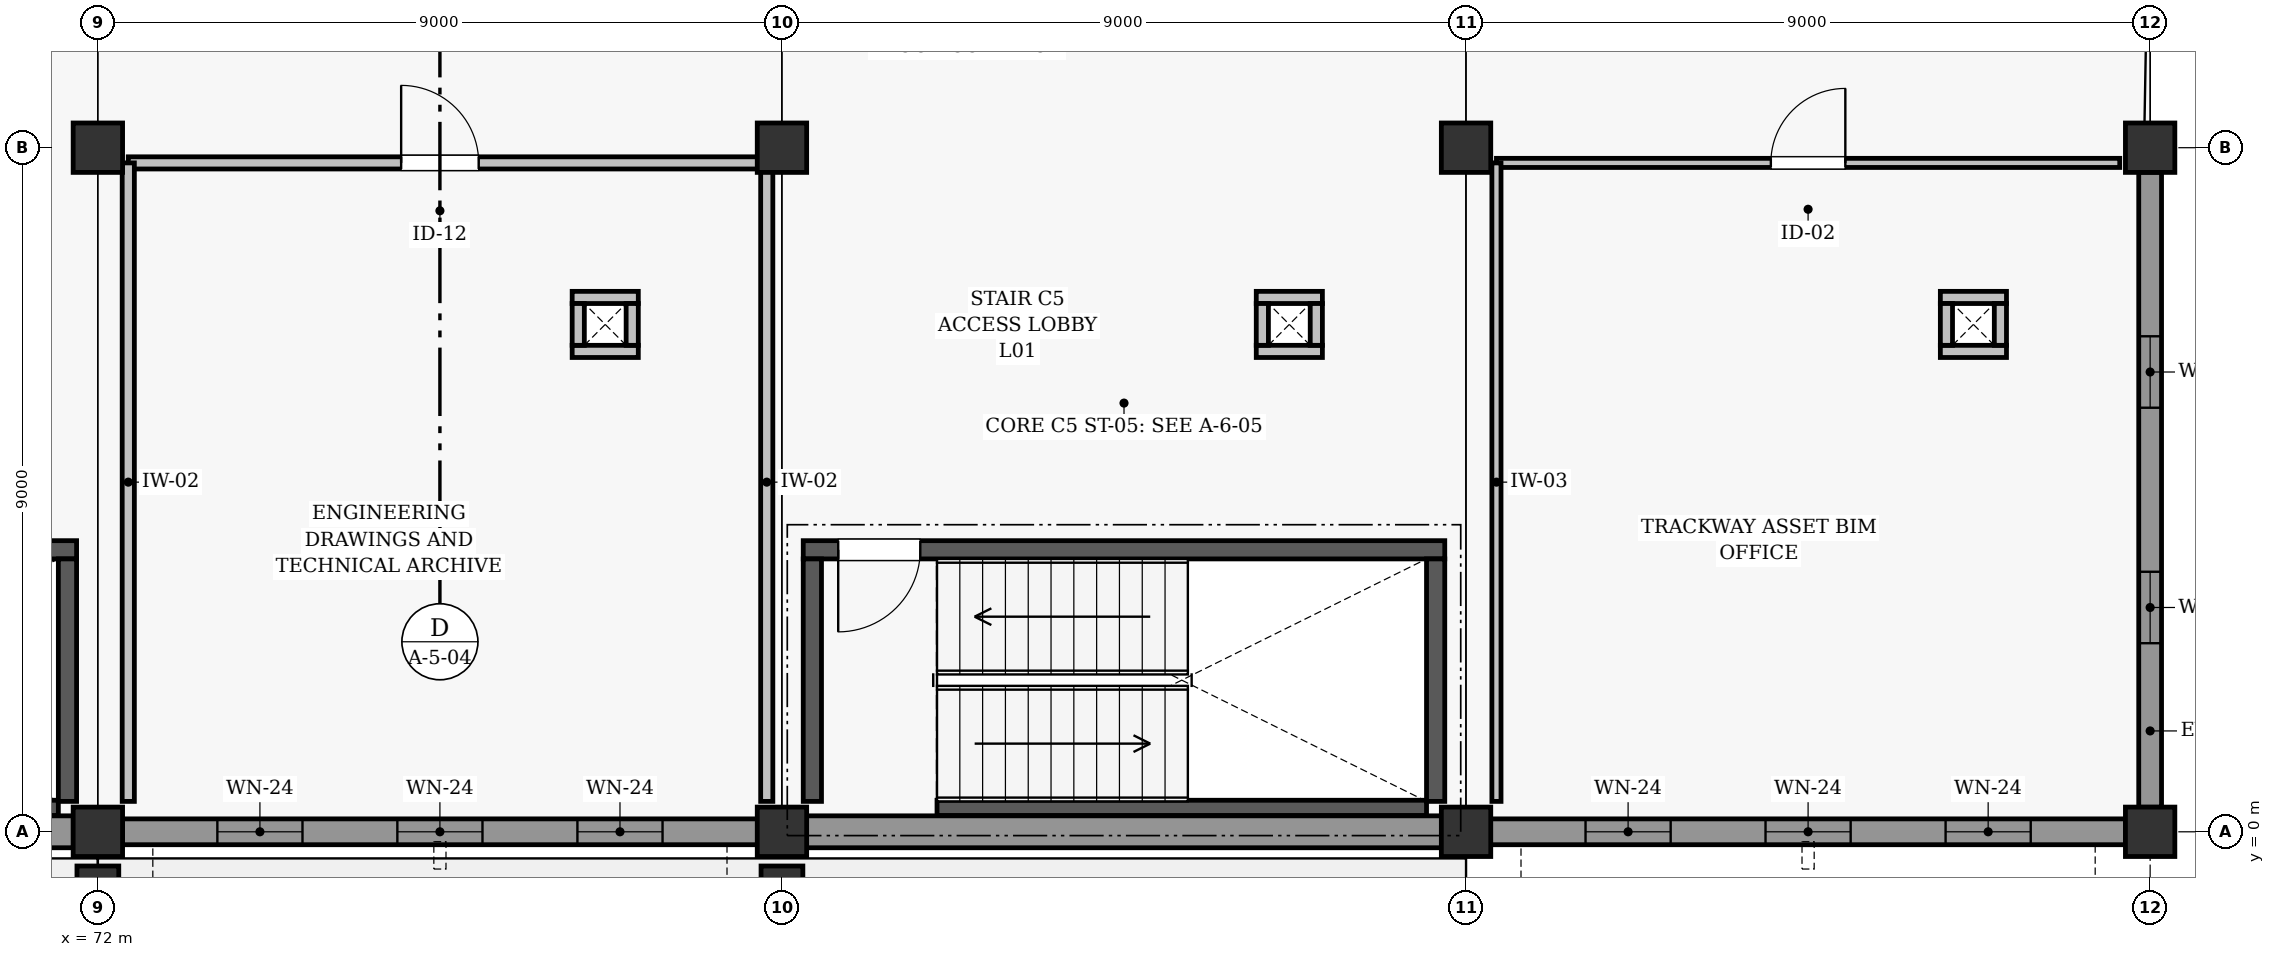
"""IFC4 building model, lengths in metres.
Left out: names, types, materials, properties, quantities, classifications, styles, units other than length and angle.
Written with IfcOpenShell. Run it as: python <this file> out.ifc"""

import sys

from ifc_helpers import new_model, si_unit, direction, frame, frame_2d, origin, origin_2d, place, context, subcontext, project, spatial, rectangle, extrude, element, fill, save


model = new_model("IFC4")
c1 = context("Model", 3, precision=1e-05, world=origin(), true_north=direction((0.0, 1.0)))
c2 = subcontext(c1, "Body", "Model", "MODEL_VIEW")
j1 = project(units=[si_unit("LENGTHUNIT", "METRE"), si_unit("PLANEANGLEUNIT", "RADIAN")], contexts=[c1])
p1 = place(None, origin())
s1 = spatial("IfcSite", under=j1, at=p1, CompositionType="ELEMENT")
p2 = place(p1, origin())
s2 = spatial("IfcBuilding", under=s1, at=p2, CompositionType="ELEMENT")
p3 = place(p2, frame((0.0, 0.0, 4.8)))
s3 = spatial("IfcBuildingStorey", under=s2, at=p3, CompositionType="ELEMENT", Elevation=4.8)
for number, where, z_axis, x_axis in (
    (1, (72.0, 0.0, 0.0), (0.0, 0.0, 1.0), (1.0, 0.0, 0.0)),
    (2, (72.0, 9.0, 0.0), (0.0, 0.0, 1.0), (1.0, 0.0, 0.0)),
    (3, (81.0, 0.0, 0.0), (0.0, 0.0, 1.0), (1.0, 0.0, 0.0)),
    (4, (81.0, 9.0, 0.0), (0.0, 0.0, 1.0), (1.0, 0.0, 0.0)),
    (5, (90.0, 0.0, 0.0), (0.0, 0.0, 1.0), (1.0, 0.0, 0.0)),
    (6, (90.0, 9.0, 0.0), (0.0, 0.0, 1.0), (1.0, 0.0, 0.0)),
    (7, (99.0, 0.0, 0.0), (0.0, 0.0, 1.0), (1.0, 0.0, 0.0)),
    (8, (99.0, 9.0, 0.0), (0.0, 0.0, 1.0), (1.0, 0.0, 0.0)),
):
    element("IfcColumn", number, at=place(p3, frame(where, z_axis=z_axis, x_axis=x_axis)), inside=s3, PredefinedType="COLUMN", context=c2, shape_type="SweptSolid", body=[
        extrude(rectangle(XDim=0.65, YDim=0.65, at=origin_2d()), origin(), (0.0, 0.0, 1.0), 3.6),
    ])
for number, where, z_axis, x_axis in (
    (9, (72.0, -0.85, 0.0), (0.0, 0.0, 1.0), (1.0, 0.0, 0.0)),
    (10, (81.0, -0.85, 0.0), (0.0, 0.0, 1.0), (1.0, 0.0, 0.0)),
):
    element("IfcColumn", number, at=place(p3, frame(where, z_axis=z_axis, x_axis=x_axis)), inside=s3, PredefinedType="PILASTER", context=c2, shape_type="SweptSolid", body=[
        extrude(rectangle(XDim=0.55, YDim=0.8, at=origin_2d()), origin(), (0.0, 0.0, 1.0), 3.6),
    ])
p4 = place(p3, frame((63.323, 0.0, 0.0), z_axis=(0.0, 0.0, 1.0), x_axis=(1.0, 0.0, 0.0)))
e11 = element("IfcWall", 11, at=p4, inside=s3, PredefinedType="SOLIDWALL", context=c2, shape_type="SweptSolid", body=[
    extrude(rectangle(XDim=8.354, YDim=0.42, at=frame_2d((4.177, 0.0))), origin(), (0.0, 0.0, 1.0), 2.642),
])
p5 = place(p3, frame((72.323, 0.0, 0.0), z_axis=(0.0, 0.0, 1.0), x_axis=(1.0, 0.0, 0.0)))
e12 = element("IfcWall", 12, at=p5, inside=s3, PredefinedType="SOLIDWALL", context=c2, shape_type="SweptSolid", body=[
    extrude(rectangle(XDim=8.354, YDim=0.34, at=frame_2d((4.177, 0.0))), origin(), (0.0, 0.0, 1.0), 2.642),
])
p6 = place(p5, frame((1.249, 0.0, 0.8)))
e13 = element("IfcOpeningElement", 13, at=p6, cuts=e12, PredefinedType="OPENING", context=c2, shape_type="SweptSolid", body=[
    extrude(rectangle(XDim=1.12, YDim=1.08, at=frame_2d((0.56, 0.54))), frame((0.0, 0.18, 0.0), z_axis=(0.0, -1.0, 0.0), x_axis=(1.0, 0.0, 0.0)), (0.0, 0.0, 1.0), 0.36),
])
p7 = place(p5, frame((3.617, 0.0, 0.8)))
e14 = element("IfcOpeningElement", 14, at=p7, cuts=e12, PredefinedType="OPENING", context=c2, shape_type="SweptSolid", body=[
    extrude(rectangle(XDim=1.12, YDim=1.08, at=frame_2d((0.56, 0.54))), frame((0.0, 0.18, 0.0), z_axis=(0.0, -1.0, 0.0), x_axis=(1.0, 0.0, 0.0)), (0.0, 0.0, 1.0), 0.36),
])
p8 = place(p5, frame((5.986, 0.0, 0.8)))
e15 = element("IfcOpeningElement", 15, at=p8, cuts=e12, PredefinedType="OPENING", context=c2, shape_type="SweptSolid", body=[
    extrude(rectangle(XDim=1.12, YDim=1.08, at=frame_2d((0.56, 0.54))), frame((0.0, 0.18, 0.0), z_axis=(0.0, -1.0, 0.0), x_axis=(1.0, 0.0, 0.0)), (0.0, 0.0, 1.0), 0.36),
])
p9 = place(p3, frame((81.323, 0.0, 0.0), z_axis=(0.0, 0.0, 1.0), x_axis=(1.0, 0.0, 0.0)))
e16 = element("IfcWall", 16, at=p9, inside=s3, PredefinedType="SOLIDWALL", context=c2, shape_type="SweptSolid", body=[
    extrude(rectangle(XDim=8.354, YDim=0.42, at=frame_2d((4.177, 0.0))), origin(), (0.0, 0.0, 1.0), 2.642),
])
p10 = place(p3, frame((90.323, 0.0, 0.0), z_axis=(0.0, 0.0, 1.0), x_axis=(1.0, 0.0, 0.0)))
e17 = element("IfcWall", 17, at=p10, inside=s3, PredefinedType="SOLIDWALL", context=c2, shape_type="SweptSolid", body=[
    extrude(rectangle(XDim=8.354, YDim=0.34, at=frame_2d((4.177, 0.0))), origin(), (0.0, 0.0, 1.0), 2.702),
])
p11 = place(p10, frame((1.249, 0.0, 0.8)))
e18 = element("IfcOpeningElement", 18, at=p11, cuts=e17, PredefinedType="OPENING", context=c2, shape_type="SweptSolid", body=[
    extrude(rectangle(XDim=1.12, YDim=1.08, at=frame_2d((0.56, 0.54))), frame((0.0, 0.18, 0.0), z_axis=(0.0, -1.0, 0.0), x_axis=(1.0, 0.0, 0.0)), (0.0, 0.0, 1.0), 0.36),
])
p12 = place(p10, frame((3.617, 0.0, 0.8)))
e19 = element("IfcOpeningElement", 19, at=p12, cuts=e17, PredefinedType="OPENING", context=c2, shape_type="SweptSolid", body=[
    extrude(rectangle(XDim=1.12, YDim=1.08, at=frame_2d((0.56, 0.54))), frame((0.0, 0.18, 0.0), z_axis=(0.0, -1.0, 0.0), x_axis=(1.0, 0.0, 0.0)), (0.0, 0.0, 1.0), 0.36),
])
p13 = place(p10, frame((5.986, 0.0, 0.8)))
e20 = element("IfcOpeningElement", 20, at=p13, cuts=e17, PredefinedType="OPENING", context=c2, shape_type="SweptSolid", body=[
    extrude(rectangle(XDim=1.12, YDim=1.08, at=frame_2d((0.56, 0.54))), frame((0.0, 0.18, 0.0), z_axis=(0.0, -1.0, 0.0), x_axis=(1.0, 0.0, 0.0)), (0.0, 0.0, 1.0), 0.36),
])
p14 = place(p3, frame((99.0, 0.323, 0.0), z_axis=(0.0, 0.0, 1.0), x_axis=(0.0, 1.0, 0.0)))
e21 = element("IfcWall", 21, at=p14, inside=s3, PredefinedType="SOLIDWALL", context=c2, shape_type="SweptSolid", body=[
    extrude(rectangle(XDim=8.354, YDim=0.3, at=frame_2d((4.177, 0.0))), origin(), (0.0, 0.0, 1.0), 2.902),
])
p15 = place(p14, frame((2.158, 0.0, 0.85)))
e22 = element("IfcOpeningElement", 22, at=p15, cuts=e21, PredefinedType="OPENING", context=c2, shape_type="SweptSolid", body=[
    extrude(rectangle(XDim=0.94, YDim=1.28, at=frame_2d((0.47, 0.64))), frame((0.0, 0.16, 0.0), z_axis=(0.0, -1.0, 0.0), x_axis=(1.0, 0.0, 0.0)), (0.0, 0.0, 1.0), 0.32),
])
p16 = place(p14, frame((5.256, 0.0, 0.85)))
e23 = element("IfcOpeningElement", 23, at=p16, cuts=e21, PredefinedType="OPENING", context=c2, shape_type="SweptSolid", body=[
    extrude(rectangle(XDim=0.94, YDim=1.28, at=frame_2d((0.47, 0.64))), frame((0.0, 0.16, 0.0), z_axis=(0.0, -1.0, 0.0), x_axis=(1.0, 0.0, 0.0)), (0.0, 0.0, 1.0), 0.32),
])
p17 = place(p3, frame((65.04, 0.315, 0.0), z_axis=(0.0, 0.0, 1.0), x_axis=(1.0, 0.0, 0.0)))
e24 = element("IfcWall", 24, at=p17, inside=s3, PredefinedType="SHEAR", context=c2, shape_type="SweptSolid", body=[
    extrude(rectangle(XDim=6.44, YDim=0.2, at=frame_2d((3.22, 0.0))), origin(), (0.0, 0.0, 1.0), 3.35),
])
p18 = place(p3, frame((63.28, 3.71, 0.0), z_axis=(0.0, 0.0, 1.0), x_axis=(1.0, 0.0, 0.0)))
e25 = element("IfcWall", 25, at=p18, inside=s3, PredefinedType="SHEAR", context=c2, shape_type="SweptSolid", body=[
    extrude(rectangle(XDim=8.44, YDim=0.24, at=frame_2d((4.22, 0.0))), origin(), (0.0, 0.0, 1.0), 3.35),
])
p19 = place(p18, frame((0.46, 0.0, 0.0)))
e26 = element("IfcOpeningElement", 26, at=p19, cuts=e25, PredefinedType="OPENING", context=c2, shape_type="SweptSolid", body=[
    extrude(rectangle(XDim=1.08, YDim=2.08, at=frame_2d((0.54, 1.04))), frame((0.0, 0.13, 0.0), z_axis=(0.0, -1.0, 0.0), x_axis=(1.0, 0.0, 0.0)), (0.0, 0.0, 1.0), 0.26),
])
p20 = place(p3, frame((71.6, 0.4, 0.0), z_axis=(0.0, 0.0, 1.0), x_axis=(0.0, 1.0, 0.0)))
e27 = element("IfcWall", 27, at=p20, inside=s3, PredefinedType="SHEAR", context=c2, shape_type="SweptSolid", body=[
    extrude(rectangle(XDim=3.19, YDim=0.24, at=frame_2d((1.595, 0.0))), origin(), (0.0, 0.0, 1.0), 3.35),
])
p21 = place(p3, frame((83.04, 0.315, 0.0), z_axis=(0.0, 0.0, 1.0), x_axis=(1.0, 0.0, 0.0)))
e28 = element("IfcWall", 28, at=p21, inside=s3, PredefinedType="SHEAR", context=c2, shape_type="SweptSolid", body=[
    extrude(rectangle(XDim=6.44, YDim=0.2, at=frame_2d((3.22, 0.0))), origin(), (0.0, 0.0, 1.0), 3.35),
])
p22 = place(p3, frame((81.28, 3.71, 0.0), z_axis=(0.0, 0.0, 1.0), x_axis=(1.0, 0.0, 0.0)))
e29 = element("IfcWall", 29, at=p22, inside=s3, PredefinedType="SHEAR", context=c2, shape_type="SweptSolid", body=[
    extrude(rectangle(XDim=8.44, YDim=0.24, at=frame_2d((4.22, 0.0))), origin(), (0.0, 0.0, 1.0), 3.35),
])
p23 = place(p22, frame((0.46, 0.0, 0.0)))
e30 = element("IfcOpeningElement", 30, at=p23, cuts=e29, PredefinedType="OPENING", context=c2, shape_type="SweptSolid", body=[
    extrude(rectangle(XDim=1.08, YDim=2.08, at=frame_2d((0.54, 1.04))), frame((0.0, 0.13, 0.0), z_axis=(0.0, -1.0, 0.0), x_axis=(1.0, 0.0, 0.0)), (0.0, 0.0, 1.0), 0.26),
])
for number, where, z_axis, x_axis in (
    (31, (81.4, 0.4, 0.0), (0.0, 0.0, 1.0), (0.0, 1.0, 0.0)),
    (32, (89.6, 0.4, 0.0), (0.0, 0.0, 1.0), (0.0, 1.0, 0.0)),
):
    element("IfcWall", number, at=place(p3, frame(where, z_axis=z_axis, x_axis=x_axis)), inside=s3, PredefinedType="SHEAR", context=c2, shape_type="SweptSolid", body=[
        extrude(rectangle(XDim=3.19, YDim=0.24, at=frame_2d((1.595, 0.0))), origin(), (0.0, 0.0, 1.0), 3.35),
    ])
for number, where, z_axis, x_axis in (
    (33, (78.24, 6.32, 0.0), (0.0, 0.0, 1.0), (1.0, 0.0, 0.0)),
    (34, (78.24, 7.03, 0.0), (0.0, 0.0, 1.0), (1.0, 0.0, 0.0)),
):
    element("IfcWall", number, at=place(p3, frame(where, z_axis=z_axis, x_axis=x_axis)), inside=s3, PredefinedType="PARTITIONING", context=c2, shape_type="SweptSolid", body=[
        extrude(rectangle(XDim=0.87, YDim=0.16, at=frame_2d((0.435, 0.0))), origin(), (0.0, 0.0, 1.0), 3.35),
    ])
for number, where, z_axis, x_axis in (
    (35, (78.32, 6.4, 0.0), (0.0, 0.0, 1.0), (0.0, 1.0, 0.0)),
    (36, (79.03, 6.4, 0.0), (0.0, 0.0, 1.0), (0.0, 1.0, 0.0)),
):
    element("IfcWall", number, at=place(p3, frame(where, z_axis=z_axis, x_axis=x_axis)), inside=s3, PredefinedType="PARTITIONING", context=c2, shape_type="SweptSolid", body=[
        extrude(rectangle(XDim=0.55, YDim=0.16, at=frame_2d((0.275, 0.0))), origin(), (0.0, 0.0, 1.0), 3.35),
    ])
for number, where, z_axis, x_axis in (
    (37, (87.24, 6.32, 0.0), (0.0, 0.0, 1.0), (1.0, 0.0, 0.0)),
    (38, (87.24, 7.03, 0.0), (0.0, 0.0, 1.0), (1.0, 0.0, 0.0)),
):
    element("IfcWall", number, at=place(p3, frame(where, z_axis=z_axis, x_axis=x_axis)), inside=s3, PredefinedType="PARTITIONING", context=c2, shape_type="SweptSolid", body=[
        extrude(rectangle(XDim=0.87, YDim=0.16, at=frame_2d((0.435, 0.0))), origin(), (0.0, 0.0, 1.0), 3.35),
    ])
for number, where, z_axis, x_axis in (
    (39, (87.32, 6.4, 0.0), (0.0, 0.0, 1.0), (0.0, 1.0, 0.0)),
    (40, (88.03, 6.4, 0.0), (0.0, 0.0, 1.0), (0.0, 1.0, 0.0)),
):
    element("IfcWall", number, at=place(p3, frame(where, z_axis=z_axis, x_axis=x_axis)), inside=s3, PredefinedType="PARTITIONING", context=c2, shape_type="SweptSolid", body=[
        extrude(rectangle(XDim=0.55, YDim=0.16, at=frame_2d((0.275, 0.0))), origin(), (0.0, 0.0, 1.0), 3.35),
    ])
for number, where, z_axis, x_axis in (
    (41, (96.24, 6.32, 0.0), (0.0, 0.0, 1.0), (1.0, 0.0, 0.0)),
    (42, (96.24, 7.03, 0.0), (0.0, 0.0, 1.0), (1.0, 0.0, 0.0)),
):
    element("IfcWall", number, at=place(p3, frame(where, z_axis=z_axis, x_axis=x_axis)), inside=s3, PredefinedType="PARTITIONING", context=c2, shape_type="SweptSolid", body=[
        extrude(rectangle(XDim=0.87, YDim=0.16, at=frame_2d((0.435, 0.0))), origin(), (0.0, 0.0, 1.0), 3.35),
    ])
for number, where, z_axis, x_axis in (
    (43, (96.32, 6.4, 0.0), (0.0, 0.0, 1.0), (0.0, 1.0, 0.0)),
    (44, (97.03, 6.4, 0.0), (0.0, 0.0, 1.0), (0.0, 1.0, 0.0)),
):
    element("IfcWall", number, at=place(p3, frame(where, z_axis=z_axis, x_axis=x_axis)), inside=s3, PredefinedType="PARTITIONING", context=c2, shape_type="SweptSolid", body=[
        extrude(rectangle(XDim=0.55, YDim=0.16, at=frame_2d((0.275, 0.0))), origin(), (0.0, 0.0, 1.0), 3.35),
    ])
p24 = place(p3, frame((72.4, 8.8, 0.0), z_axis=(0.0, 0.0, 1.0), x_axis=(1.0, 0.0, 0.0)))
e45 = element("IfcWall", 45, at=p24, inside=s3, PredefinedType="PARTITIONING", context=c2, shape_type="SweptSolid", body=[
    extrude(rectangle(XDim=8.4, YDim=0.16, at=frame_2d((4.2, 0.0))), origin(), (0.0, 0.0, 1.0), 2.595),
])
p25 = place(p24, frame((3.59, 0.0, 0.0)))
e46 = element("IfcOpeningElement", 46, at=p25, cuts=e45, PredefinedType="OPENING", context=c2, shape_type="SweptSolid", body=[
    extrude(rectangle(XDim=1.02, YDim=2.1, at=frame_2d((0.51, 1.05))), frame((0.0, 0.09, 0.0), z_axis=(0.0, -1.0, 0.0), x_axis=(1.0, 0.0, 0.0)), (0.0, 0.0, 1.0), 0.18),
])
for number, where, z_axis, x_axis in (
    (47, (72.4, 0.4, 0.0), (0.0, 0.0, 1.0), (0.0, 1.0, 0.0)),
    (48, (80.8, 0.4, 0.0), (0.0, 0.0, 1.0), (0.0, 1.0, 0.0)),
):
    element("IfcWall", number, at=place(p3, frame(where, z_axis=z_axis, x_axis=x_axis)), inside=s3, PredefinedType="PARTITIONING", context=c2, shape_type="SweptSolid", body=[
        extrude(rectangle(XDim=8.4, YDim=0.16, at=frame_2d((4.2, 0.0))), origin(), (0.0, 0.0, 1.0), 2.595),
    ])
p26 = place(p3, frame((90.4, 8.8, 0.0), z_axis=(0.0, 0.0, 1.0), x_axis=(1.0, 0.0, 0.0)))
e49 = element("IfcWall", 49, at=p26, inside=s3, PredefinedType="PARTITIONING", context=c2, shape_type="SweptSolid", body=[
    extrude(rectangle(XDim=8.2, YDim=0.12, at=frame_2d((4.1, 0.0))), origin(), (0.0, 0.0, 1.0), 2.655),
])
p27 = place(p26, frame((3.61, 0.0, 0.0)))
e50 = element("IfcOpeningElement", 50, at=p27, cuts=e49, PredefinedType="OPENING", context=c2, shape_type="SweptSolid", body=[
    extrude(rectangle(XDim=0.98, YDim=2.08, at=frame_2d((0.49, 1.04))), frame((0.0, 0.07, 0.0), z_axis=(0.0, -1.0, 0.0), x_axis=(1.0, 0.0, 0.0)), (0.0, 0.0, 1.0), 0.14),
])
p28 = place(p3, frame((90.4, 0.4, 0.0), z_axis=(0.0, 0.0, 1.0), x_axis=(0.0, 1.0, 0.0)))
e51 = element("IfcWall", 51, at=p28, inside=s3, PredefinedType="PARTITIONING", context=c2, shape_type="SweptSolid", body=[
    extrude(rectangle(XDim=8.4, YDim=0.12, at=frame_2d((4.2, 0.0))), origin(), (0.0, 0.0, 1.0), 2.655),
])
p29 = place(p6, origin())
e52 = element("IfcWindow", 52, at=p29, inside=s3, PartitioningType="SINGLE_PANEL", PredefinedType="WINDOW", context=c2, shape_type="SweptSolid", body=[
    extrude(rectangle(XDim=1.12, YDim=1.08, at=frame_2d((0.56, 0.54))), frame((0.0, 0.03, 0.0), z_axis=(0.0, -1.0, 0.0), x_axis=(1.0, 0.0, 0.0)), (0.0, 0.0, 1.0), 0.06),
])
fill(e13, e52)
p30 = place(p7, origin())
e53 = element("IfcWindow", 53, at=p30, inside=s3, PartitioningType="SINGLE_PANEL", PredefinedType="WINDOW", context=c2, shape_type="SweptSolid", body=[
    extrude(rectangle(XDim=1.12, YDim=1.08, at=frame_2d((0.56, 0.54))), frame((0.0, 0.03, 0.0), z_axis=(0.0, -1.0, 0.0), x_axis=(1.0, 0.0, 0.0)), (0.0, 0.0, 1.0), 0.06),
])
fill(e14, e53)
p31 = place(p8, origin())
e54 = element("IfcWindow", 54, at=p31, inside=s3, PartitioningType="SINGLE_PANEL", PredefinedType="WINDOW", context=c2, shape_type="SweptSolid", body=[
    extrude(rectangle(XDim=1.12, YDim=1.08, at=frame_2d((0.56, 0.54))), frame((0.0, 0.03, 0.0), z_axis=(0.0, -1.0, 0.0), x_axis=(1.0, 0.0, 0.0)), (0.0, 0.0, 1.0), 0.06),
])
fill(e15, e54)
p32 = place(p11, origin())
e55 = element("IfcWindow", 55, at=p32, inside=s3, PartitioningType="SINGLE_PANEL", PredefinedType="WINDOW", context=c2, shape_type="SweptSolid", body=[
    extrude(rectangle(XDim=1.12, YDim=1.08, at=frame_2d((0.56, 0.54))), frame((0.0, 0.03, 0.0), z_axis=(0.0, -1.0, 0.0), x_axis=(1.0, 0.0, 0.0)), (0.0, 0.0, 1.0), 0.06),
])
fill(e18, e55)
p33 = place(p12, origin())
e56 = element("IfcWindow", 56, at=p33, inside=s3, PartitioningType="SINGLE_PANEL", PredefinedType="WINDOW", context=c2, shape_type="SweptSolid", body=[
    extrude(rectangle(XDim=1.12, YDim=1.08, at=frame_2d((0.56, 0.54))), frame((0.0, 0.03, 0.0), z_axis=(0.0, -1.0, 0.0), x_axis=(1.0, 0.0, 0.0)), (0.0, 0.0, 1.0), 0.06),
])
fill(e19, e56)
p34 = place(p13, origin())
e57 = element("IfcWindow", 57, at=p34, inside=s3, PartitioningType="SINGLE_PANEL", PredefinedType="WINDOW", context=c2, shape_type="SweptSolid", body=[
    extrude(rectangle(XDim=1.12, YDim=1.08, at=frame_2d((0.56, 0.54))), frame((0.0, 0.03, 0.0), z_axis=(0.0, -1.0, 0.0), x_axis=(1.0, 0.0, 0.0)), (0.0, 0.0, 1.0), 0.06),
])
fill(e20, e57)
p35 = place(p15, origin())
e58 = element("IfcWindow", 58, at=p35, inside=s3, PartitioningType="SINGLE_PANEL", PredefinedType="WINDOW", context=c2, shape_type="SweptSolid", body=[
    extrude(rectangle(XDim=0.94, YDim=1.28, at=frame_2d((0.47, 0.64))), frame((0.0, 0.03, 0.0), z_axis=(0.0, -1.0, 0.0), x_axis=(1.0, 0.0, 0.0)), (0.0, 0.0, 1.0), 0.06),
])
fill(e22, e58)
p36 = place(p16, origin())
e59 = element("IfcWindow", 59, at=p36, inside=s3, PartitioningType="SINGLE_PANEL", PredefinedType="WINDOW", context=c2, shape_type="SweptSolid", body=[
    extrude(rectangle(XDim=0.94, YDim=1.28, at=frame_2d((0.47, 0.64))), frame((0.0, 0.03, 0.0), z_axis=(0.0, -1.0, 0.0), x_axis=(1.0, 0.0, 0.0)), (0.0, 0.0, 1.0), 0.06),
])
fill(e23, e59)
p37 = place(p23, frame((1.08, 0.0, 0.0), z_axis=(0.0, 0.0, 1.0), x_axis=(-1.0, 0.0, 0.0)))
e60 = element("IfcDoor", 60, at=p37, inside=s3, OperationType="SINGLE_SWING_LEFT", PredefinedType="DOOR", context=c2, shape_type="SweptSolid", body=[
    extrude(rectangle(XDim=1.08, YDim=2.08, at=frame_2d((0.54, 1.04))), frame((0.0, 0.025, 0.0), z_axis=(0.0, -1.0, 0.0), x_axis=(1.0, 0.0, 0.0)), (0.0, 0.0, 1.0), 0.05),
])
fill(e30, e60)
p38 = place(p25, origin())
e61 = element("IfcDoor", 61, at=p38, inside=s3, OperationType="SINGLE_SWING_LEFT", PredefinedType="DOOR", context=c2, shape_type="SweptSolid", body=[
    extrude(rectangle(XDim=1.02, YDim=2.1, at=frame_2d((0.51, 1.05))), frame((0.0, 0.025, 0.0), z_axis=(0.0, -1.0, 0.0), x_axis=(1.0, 0.0, 0.0)), (0.0, 0.0, 1.0), 0.05),
])
fill(e46, e61)
p39 = place(p27, origin())
e62 = element("IfcDoor", 62, at=p39, inside=s3, OperationType="SINGLE_SWING_RIGHT", PredefinedType="DOOR", context=c2, shape_type="SweptSolid", body=[
    extrude(rectangle(XDim=0.98, YDim=2.08, at=frame_2d((0.49, 1.04))), frame((0.0, 0.025, 0.0), z_axis=(0.0, -1.0, 0.0), x_axis=(1.0, 0.0, 0.0)), (0.0, 0.0, 1.0), 0.05),
])
fill(e50, e62)
save(model, sys.argv[1])
